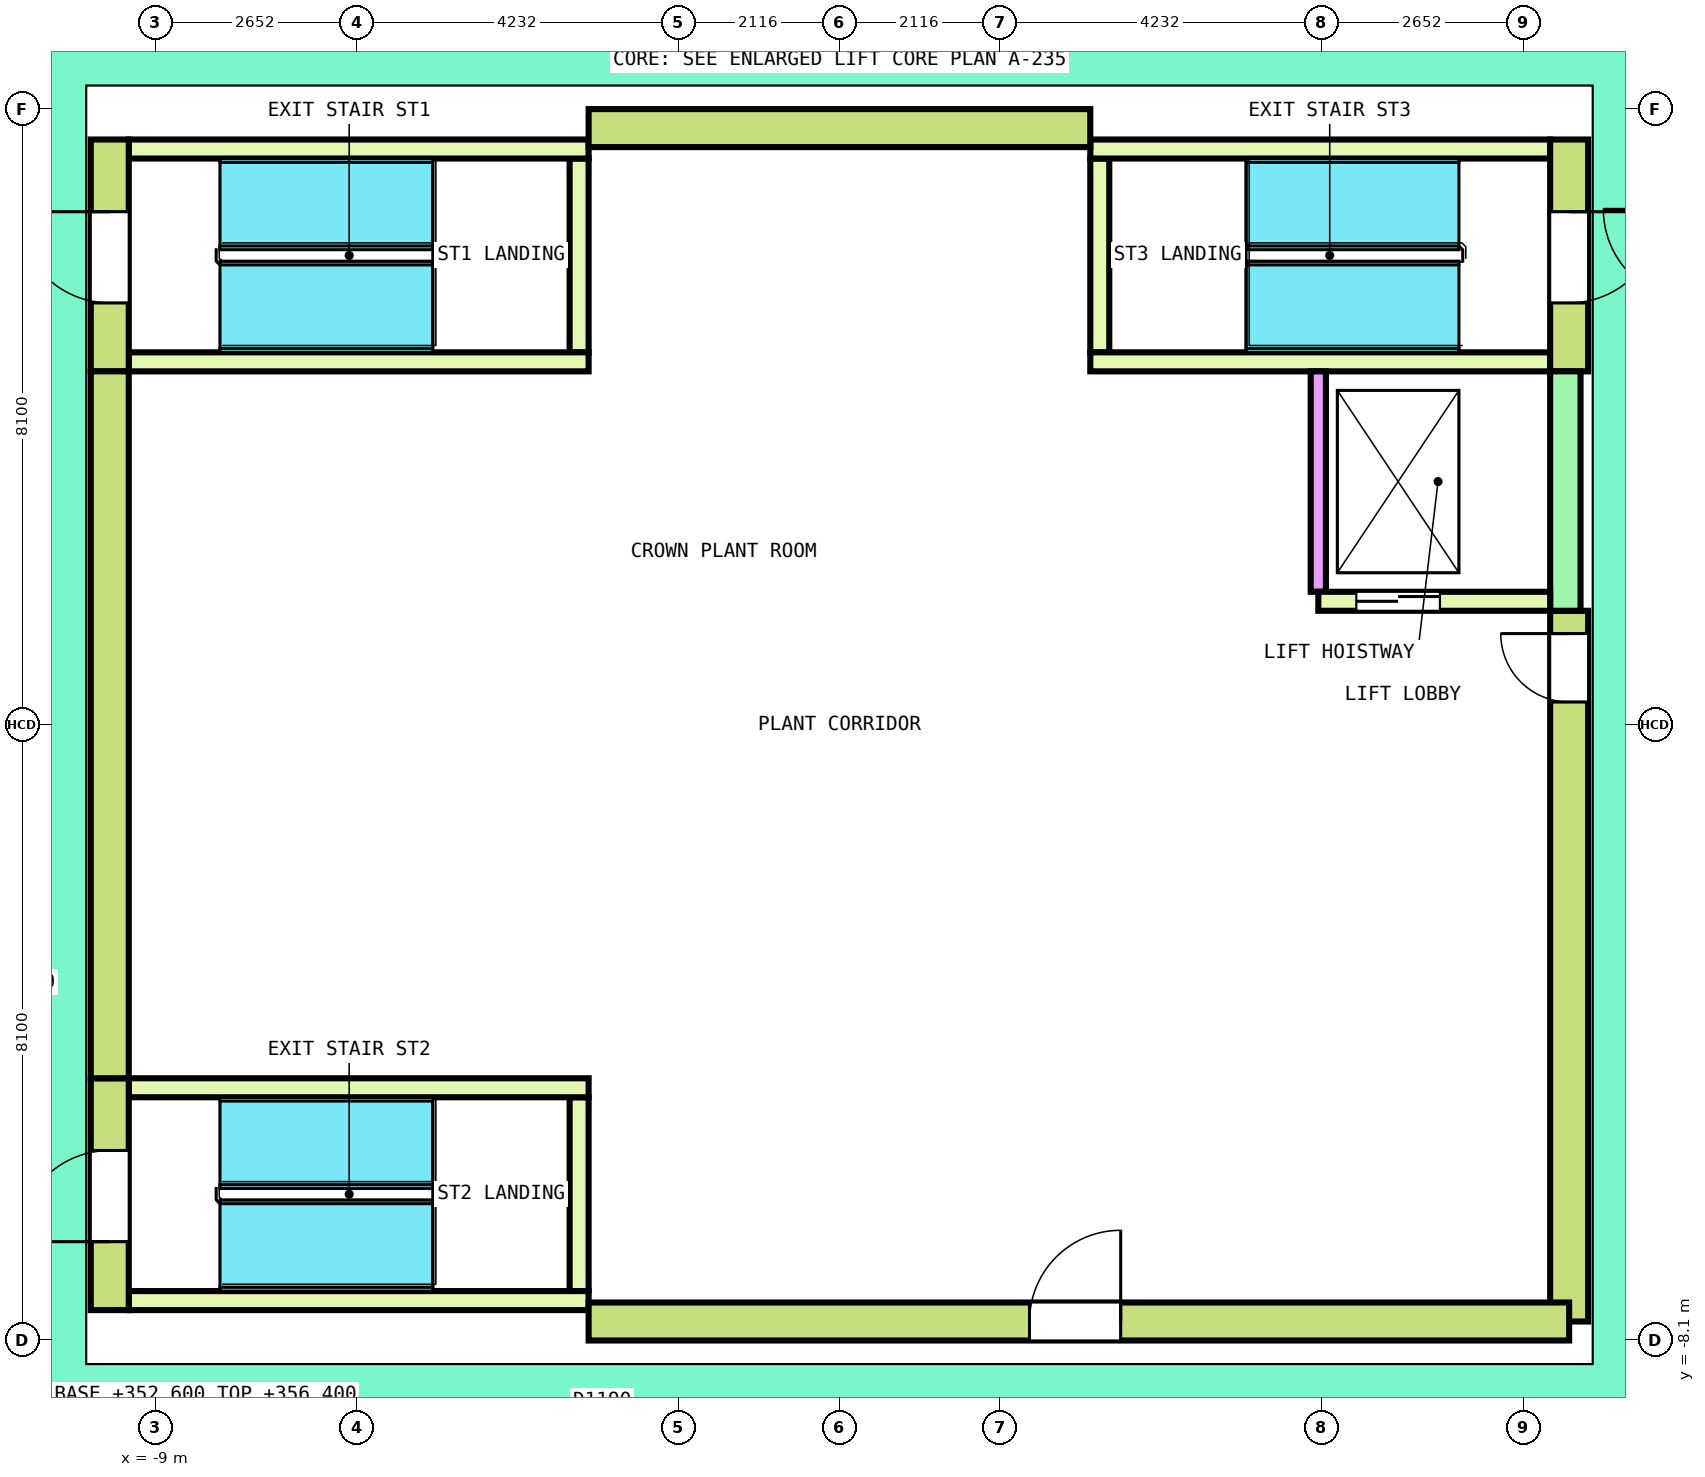
"""IFC4 building model, lengths in metres.
Left out: names, types, materials, properties, quantities, classifications, styles, units other than length and angle.
Written with IfcOpenShell. Run it as: python <this file> out.ifc"""

import sys

from ifc_helpers import new_model, si_unit, direction, frame, frame_2d, origin, place, context, subcontext, project, spatial, rectangle, extrude, element, fill, save


model = new_model("IFC4")
c1 = context("Model", 3, precision=1e-05, world=origin(), true_north=direction((0.0, 1.0)))
c2 = subcontext(c1, "Body", "Model", "MODEL_VIEW")
j1 = project(units=[si_unit("LENGTHUNIT", "METRE"), si_unit("PLANEANGLEUNIT", "RADIAN")], contexts=[c1])
p1 = place(None, origin())
s1 = spatial("IfcSite", under=j1, at=p1, CompositionType="ELEMENT")
p2 = place(p1, origin())
s2 = spatial("IfcBuilding", under=s1, at=p2, CompositionType="ELEMENT")
p3 = place(p2, frame((0.0, 0.0, 352.6)))
s3 = spatial("IfcBuildingStorey", under=s2, at=p3, CompositionType="ELEMENT", Elevation=352.6)
p4 = place(p3, frame((9.6, -7.85, 0.0), z_axis=(0.0, 0.0, 1.0), x_axis=(0.0, 1.0, 0.0)))
e1 = element("IfcWall", 1, at=p4, inside=s3, PredefinedType="SHEAR", context=c2, shape_type="SweptSolid", body=[
    extrude(rectangle(XDim=9.35, YDim=0.5, at=frame_2d((4.675, 0.0))), origin(), (0.0, 0.0, 1.0), 3.8),
])
p5 = place(p4, frame((8.15, 0.0, 0.0)))
e2 = element("IfcOpeningElement", 2, at=p5, cuts=e1, PredefinedType="OPENING", context=c2, shape_type="SweptSolid", body=[
    extrude(rectangle(XDim=0.9, YDim=2.1, at=frame_2d((0.45, 1.05))), frame((0.0, 0.26, 0.0), z_axis=(0.0, -1.0, 0.0), x_axis=(1.0, 0.0, 0.0)), (0.0, 0.0, 1.0), 0.52),
])
p6 = place(p3, frame((3.3, 7.85, 0.0), z_axis=(0.0, 0.0, 1.0), x_axis=(-1.0, 0.0, 0.0)))
e3 = element("IfcWall", 3, at=p6, inside=s3, PredefinedType="SHEAR", context=c2, shape_type="SweptSolid", body=[
    extrude(rectangle(XDim=6.6, YDim=0.5, at=frame_2d((3.3, 0.0))), origin(), (0.0, 0.0, 1.0), 3.8),
])
p7 = place(p3, frame((-9.6, 4.65, 0.0), z_axis=(0.0, 0.0, 1.0), x_axis=(0.0, -1.0, 0.0)))
e4 = element("IfcWall", 4, at=p7, inside=s3, PredefinedType="SHEAR", context=c2, shape_type="SweptSolid", body=[
    extrude(rectangle(XDim=9.3, YDim=0.5, at=frame_2d((4.65, 0.0))), origin(), (0.0, 0.0, 1.0), 3.8),
])
p8 = place(p3, frame((-3.3, -7.85, 0.0), z_axis=(0.0, 0.0, 1.0), x_axis=(1.0, 0.0, 0.0)))
e5 = element("IfcWall", 5, at=p8, inside=s3, PredefinedType="SHEAR", context=c2, shape_type="SweptSolid", body=[
    extrude(rectangle(XDim=12.9, YDim=0.5, at=frame_2d((6.45, 0.0))), origin(), (0.0, 0.0, 1.0), 3.8),
])
p9 = place(p8, frame((5.8, 0.0, 0.0)))
e6 = element("IfcOpeningElement", 6, at=p9, cuts=e5, PredefinedType="OPENING", context=c2, shape_type="SweptSolid", body=[
    extrude(rectangle(XDim=1.2, YDim=2.1, at=frame_2d((0.6, 1.05))), frame((0.0, 0.26, 0.0), z_axis=(0.0, -1.0, 0.0), x_axis=(1.0, 0.0, 0.0)), (0.0, 0.0, 1.0), 0.52),
])
p10 = place(p3, frame((-9.6, 4.65, 0.0), z_axis=(0.0, 0.0, 1.0), x_axis=(0.0, 1.0, 0.0)))
e7 = element("IfcWall", 7, at=p10, inside=s3, PredefinedType="SHEAR", context=c2, shape_type="SweptSolid", body=[
    extrude(rectangle(XDim=3.05, YDim=0.5, at=frame_2d((1.525, 0.0))), origin(), (0.0, 0.0, 1.0), 3.8),
])
p11 = place(p10, frame((0.9, 0.0, 0.0)))
e8 = element("IfcOpeningElement", 8, at=p11, cuts=e7, PredefinedType="OPENING", context=c2, shape_type="SweptSolid", body=[
    extrude(rectangle(XDim=1.2, YDim=2.1, at=frame_2d((0.6, 1.05))), frame((0.0, 0.26, 0.0), z_axis=(0.0, -1.0, 0.0), x_axis=(1.0, 0.0, 0.0)), (0.0, 0.0, 1.0), 0.52),
])
p12 = place(p3, frame((-3.425, 4.9, 0.0), z_axis=(0.0, 0.0, 1.0), x_axis=(0.0, 1.0, 0.0)))
e9 = element("IfcWall", 9, at=p12, inside=s3, PredefinedType="SOLIDWALL", context=c2, shape_type="SweptSolid", body=[
    extrude(rectangle(XDim=2.55, YDim=0.25, at=frame_2d((1.275, 0.0))), origin(), (0.0, 0.0, 1.0), 3.8),
])
for number, where, z_axis, x_axis in (
    (10, (-9.35, 4.775, 0.0), (0.0, 0.0, 1.0), (1.0, 0.0, 0.0)),
    (11, (-9.35, 7.575, 0.0), (0.0, 0.0, 1.0), (1.0, 0.0, 0.0)),
):
    element("IfcWall", number, at=place(p3, frame(where, z_axis=z_axis, x_axis=x_axis)), inside=s3, PredefinedType="SOLIDWALL", context=c2, shape_type="SweptSolid", body=[
        extrude(rectangle(XDim=6.05, YDim=0.25, at=frame_2d((3.025, 0.0))), origin(), (0.0, 0.0, 1.0), 3.8),
    ])
p13 = place(p3, frame((-9.6, -7.7, 0.0), z_axis=(0.0, 0.0, 1.0), x_axis=(0.0, 1.0, 0.0)))
e12 = element("IfcWall", 12, at=p13, inside=s3, PredefinedType="SHEAR", context=c2, shape_type="SweptSolid", body=[
    extrude(rectangle(XDim=3.05, YDim=0.5, at=frame_2d((1.525, 0.0))), origin(), (0.0, 0.0, 1.0), 3.8),
])
p14 = place(p13, frame((0.9, 0.0, 0.0)))
e13 = element("IfcOpeningElement", 13, at=p14, cuts=e12, PredefinedType="OPENING", context=c2, shape_type="SweptSolid", body=[
    extrude(rectangle(XDim=1.2, YDim=2.1, at=frame_2d((0.6, 1.05))), frame((0.0, 0.26, 0.0), z_axis=(0.0, -1.0, 0.0), x_axis=(1.0, 0.0, 0.0)), (0.0, 0.0, 1.0), 0.52),
])
p15 = place(p3, frame((-3.425, -7.45, 0.0), z_axis=(0.0, 0.0, 1.0), x_axis=(0.0, 1.0, 0.0)))
e14 = element("IfcWall", 14, at=p15, inside=s3, PredefinedType="SOLIDWALL", context=c2, shape_type="SweptSolid", body=[
    extrude(rectangle(XDim=2.55, YDim=0.25, at=frame_2d((1.275, 0.0))), origin(), (0.0, 0.0, 1.0), 3.8),
])
for number, where, z_axis, x_axis in (
    (15, (-9.35, -7.575, 0.0), (0.0, 0.0, 1.0), (1.0, 0.0, 0.0)),
    (16, (-9.35, -4.775, 0.0), (0.0, 0.0, 1.0), (1.0, 0.0, 0.0)),
):
    element("IfcWall", number, at=place(p3, frame(where, z_axis=z_axis, x_axis=x_axis)), inside=s3, PredefinedType="SOLIDWALL", context=c2, shape_type="SweptSolid", body=[
        extrude(rectangle(XDim=6.05, YDim=0.25, at=frame_2d((3.025, 0.0))), origin(), (0.0, 0.0, 1.0), 3.8),
    ])
p16 = place(p3, frame((9.6, 4.65, 0.0), z_axis=(0.0, 0.0, 1.0), x_axis=(0.0, 1.0, 0.0)))
e17 = element("IfcWall", 17, at=p16, inside=s3, PredefinedType="SHEAR", context=c2, shape_type="SweptSolid", body=[
    extrude(rectangle(XDim=3.05, YDim=0.5, at=frame_2d((1.525, 0.0))), origin(), (0.0, 0.0, 1.0), 3.8),
])
p17 = place(p16, frame((0.9, 0.0, 0.0)))
e18 = element("IfcOpeningElement", 18, at=p17, cuts=e17, PredefinedType="OPENING", context=c2, shape_type="SweptSolid", body=[
    extrude(rectangle(XDim=1.2, YDim=2.1, at=frame_2d((0.6, 1.05))), frame((0.0, 0.26, 0.0), z_axis=(0.0, -1.0, 0.0), x_axis=(1.0, 0.0, 0.0)), (0.0, 0.0, 1.0), 0.52),
])
p18 = place(p3, frame((3.425, 4.9, 0.0), z_axis=(0.0, 0.0, 1.0), x_axis=(0.0, 1.0, 0.0)))
e19 = element("IfcWall", 19, at=p18, inside=s3, PredefinedType="SOLIDWALL", context=c2, shape_type="SweptSolid", body=[
    extrude(rectangle(XDim=2.55, YDim=0.25, at=frame_2d((1.275, 0.0))), origin(), (0.0, 0.0, 1.0), 3.8),
])
for number, where, z_axis, x_axis in (
    (20, (3.3, 4.775, 0.0), (0.0, 0.0, 1.0), (1.0, 0.0, 0.0)),
    (21, (3.3, 7.575, 0.0), (0.0, 0.0, 1.0), (1.0, 0.0, 0.0)),
):
    element("IfcWall", number, at=place(p3, frame(where, z_axis=z_axis, x_axis=x_axis)), inside=s3, PredefinedType="SOLIDWALL", context=c2, shape_type="SweptSolid", body=[
        extrude(rectangle(XDim=6.05, YDim=0.25, at=frame_2d((3.025, 0.0))), origin(), (0.0, 0.0, 1.0), 3.8),
    ])
p19 = place(p3, frame((6.3, 1.625, 0.0), z_axis=(0.0, 0.0, 1.0), x_axis=(1.0, 0.0, 0.0)))
e22 = element("IfcWall", 22, at=p19, inside=s3, PredefinedType="SOLIDWALL", context=c2, shape_type="SweptSolid", body=[
    extrude(rectangle(XDim=3.05, YDim=0.25, at=frame_2d((1.525, 0.0))), origin(), (0.0, 0.0, 1.0), 3.8),
])
p20 = place(p19, frame((0.5, 0.0, 0.0)))
e23 = element("IfcOpeningElement", 23, at=p20, cuts=e22, PredefinedType="OPENING", context=c2, shape_type="SweptSolid", body=[
    extrude(rectangle(XDim=1.1, YDim=2.1, at=frame_2d((0.55, 1.05))), frame((0.0, 0.135, 0.0), z_axis=(0.0, -1.0, 0.0), x_axis=(1.0, 0.0, 0.0)), (0.0, 0.0, 1.0), 0.27),
])
p21 = place(p3, frame((6.3, 1.75, 0.0), z_axis=(0.0, 0.0, 1.0), x_axis=(0.0, 1.0, 0.0)))
e24 = element("IfcWall", 24, at=p21, inside=s3, PredefinedType="SOLIDWALL", context=c2, shape_type="SweptSolid", body=[
    extrude(rectangle(XDim=2.9, YDim=0.2, at=frame_2d((1.45, 0.0))), origin(), (0.0, 0.0, 1.0), 3.8),
])
p22 = place(p3, frame((9.55, 1.5, 0.0), z_axis=(0.0, 0.0, 1.0), x_axis=(0.0, 1.0, 0.0)))
e25 = element("IfcWall", 25, at=p22, inside=s3, PredefinedType="SHEAR", context=c2, shape_type="SweptSolid", body=[
    extrude(rectangle(XDim=3.15, YDim=0.4, at=frame_2d((1.575, 0.0))), origin(), (0.0, 0.0, 1.0), 3.8),
])
p23 = place(p11, origin())
e26 = element("IfcDoor", 26, at=p23, inside=s3, OperationType="SINGLE_SWING_LEFT", PredefinedType="DOOR", context=c2, shape_type="SweptSolid", body=[
    extrude(rectangle(XDim=1.2, YDim=2.1, at=frame_2d((0.6, 1.05))), frame((0.0, 0.2, 0.0), z_axis=(0.0, -1.0, 0.0), x_axis=(1.0, 0.0, 0.0)), (0.0, 0.0, 1.0), 0.4),
])
fill(e8, e26)
p24 = place(p14, origin())
e27 = element("IfcDoor", 27, at=p24, inside=s3, OperationType="SINGLE_SWING_RIGHT", PredefinedType="DOOR", context=c2, shape_type="SweptSolid", body=[
    extrude(rectangle(XDim=1.2, YDim=2.1, at=frame_2d((0.6, 1.05))), frame((0.0, 0.2, 0.0), z_axis=(0.0, -1.0, 0.0), x_axis=(1.0, 0.0, 0.0)), (0.0, 0.0, 1.0), 0.4),
])
fill(e13, e27)
p25 = place(p17, origin())
e28 = element("IfcDoor", 28, at=p25, inside=s3, OperationType="SINGLE_SWING_LEFT", PredefinedType="DOOR", context=c2, shape_type="SweptSolid", body=[
    extrude(rectangle(XDim=1.2, YDim=2.1, at=frame_2d((0.6, 1.05))), frame((0.0, 0.2, 0.0), z_axis=(0.0, -1.0, 0.0), x_axis=(1.0, 0.0, 0.0)), (0.0, 0.0, 1.0), 0.4),
])
fill(e18, e28)
p26 = place(p20, origin())
e29 = element("IfcDoor", 29, at=p26, inside=s3, OperationType="DOUBLE_DOOR_SLIDING", PredefinedType="DOOR", context=c2, shape_type="SweptSolid", body=[
    extrude(rectangle(XDim=1.1, YDim=2.1, at=frame_2d((0.55, 1.05))), frame((0.0, 0.075, 0.0), z_axis=(0.0, -1.0, 0.0), x_axis=(1.0, 0.0, 0.0)), (0.0, 0.0, 1.0), 0.15),
])
fill(e23, e29)
p27 = place(p5, origin())
e30 = element("IfcDoor", 30, at=p27, inside=s3, OperationType="SINGLE_SWING_LEFT", PredefinedType="DOOR", context=c2, shape_type="SweptSolid", body=[
    extrude(rectangle(XDim=0.9, YDim=2.1, at=frame_2d((0.45, 1.05))), frame((0.0, 0.2, 0.0), z_axis=(0.0, -1.0, 0.0), x_axis=(1.0, 0.0, 0.0)), (0.0, 0.0, 1.0), 0.4),
])
fill(e2, e30)
p28 = place(p9, origin())
e31 = element("IfcDoor", 31, at=p28, inside=s3, OperationType="SINGLE_SWING_RIGHT", PredefinedType="DOOR", context=c2, shape_type="SweptSolid", body=[
    extrude(rectangle(XDim=1.2, YDim=2.1, at=frame_2d((0.6, 1.05))), frame((0.0, 0.2, 0.0), z_axis=(0.0, -1.0, 0.0), x_axis=(1.0, 0.0, 0.0)), (0.0, 0.0, 1.0), 0.4),
])
fill(e6, e31)
save(model, sys.argv[1])
